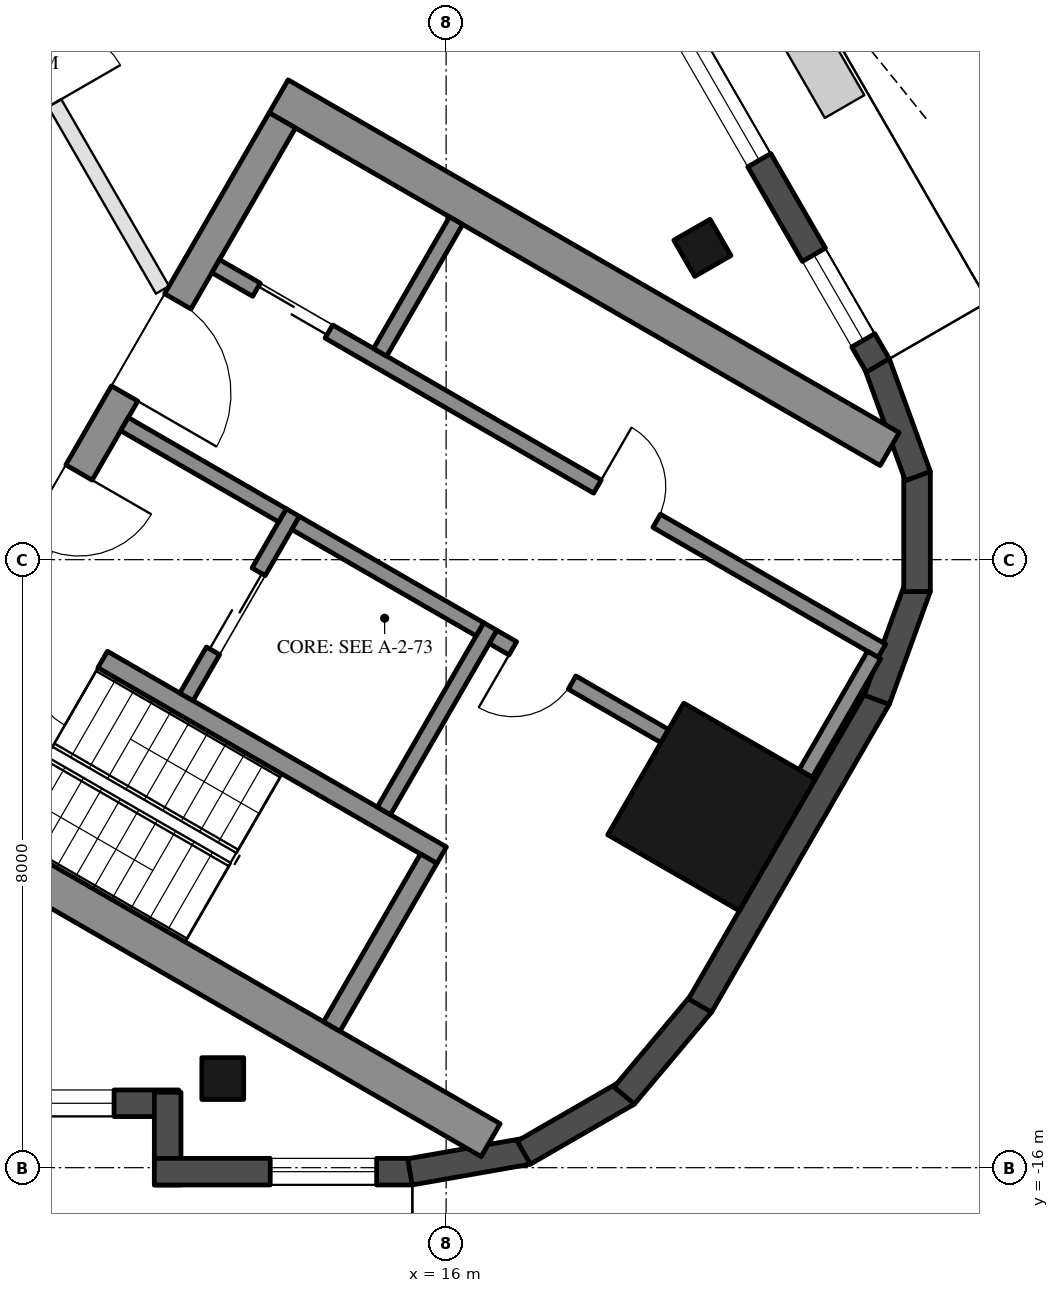
"""IFC4 building model, lengths in metres.
Left out: names, types, materials, properties, quantities, classifications, styles, units other than length and angle.
Written with IfcOpenShell. Run it as: python <this file> out.ifc"""

import sys

from ifc_helpers import new_model, si_unit, direction, frame, frame_2d, origin, origin_2d, place, context, subcontext, project, spatial, rectangle, hollow_rectangle, extrude, boolean, halfspace, element, fill, save


model = new_model("IFC4")
c1 = context("Model", 3, precision=1e-05, world=origin(), true_north=direction((0.0, 1.0)))
c2 = subcontext(c1, "Body", "Model", "MODEL_VIEW")
j1 = project(units=[si_unit("LENGTHUNIT", "METRE"), si_unit("PLANEANGLEUNIT", "RADIAN")], contexts=[c1])
p1 = place(None, origin())
s1 = spatial("IfcSite", under=j1, at=p1, CompositionType="ELEMENT")
p2 = place(p1, origin())
s2 = spatial("IfcBuilding", under=s1, at=p2, CompositionType="ELEMENT")
p3 = place(p2, frame((0.0, 0.0, 313.3)))
s3 = spatial("IfcBuildingStorey", under=s2, at=p3, CompositionType="ELEMENT", Elevation=313.3)
for number, where, z_axis, x_axis in (
    (1, (13.061, -14.827, 0.0), (0.0, 0.0, 1.0), (-1.0, 0.0, 0.0)),
    (2, (19.372, -3.898, 0.0), (0.0, 0.0, 1.0), (-0.5, 0.866, 0.0)),
):
    element("IfcColumn", number, at=place(p3, frame(where, z_axis=z_axis, x_axis=x_axis)), inside=s3, PredefinedType="COLUMN", context=c2, shape_type="SweptSolid", body=[
        boolean("DIFFERENCE", extrude(hollow_rectangle(XDim=0.55, YDim=0.55, WallThickness=0.025, at=origin_2d()), origin(), (0.0, 0.0, 1.0), 3.7), halfspace(frame((0.0, 0.0, 0.04), z_axis=(0.0, 0.0, 1.0), x_axis=(1.0, 0.0, 0.0)), True)),
    ])
p4 = place(p3, frame((19.492, -11.254, 0.0), z_axis=(0.0, 0.0, 1.0), x_axis=(0.5, 0.866025403784, 0.0)))
e3 = element("IfcColumn", 3, at=p4, inside=s3, PredefinedType="COLUMN", context=c2, shape_type="SweptSolid", body=[
    boolean("DIFFERENCE", extrude(hollow_rectangle(XDim=2.0, YDim=2.0, WallThickness=0.05, at=origin_2d()), origin(), (0.0, 0.0, 1.0), 3.7), halfspace(frame((0.0, 0.0, 0.113), z_axis=(0.0, 0.0, 1.0), x_axis=(1.0, 0.0, 0.0)), True)),
])
p5 = place(p3, frame((7.111, -15.153, 0.0), z_axis=(0.0, 0.0, 1.0), x_axis=(1.0, 0.0, 0.0)))
e4 = element("IfcWall", 4, at=p5, inside=s3, PredefinedType="SOLIDWALL", context=c2, shape_type="SweptSolid", body=[
    extrude(rectangle(XDim=5.371, YDim=0.35, at=frame_2d((2.686, 0.0))), origin(), (0.0, 0.0, 1.0), 3.55),
])
p6 = place(p5, frame((0.32, 0.0, 0.0)))
e5 = element("IfcOpeningElement", 5, at=p6, cuts=e4, PredefinedType="OPENING", context=c2, shape_type="SweptSolid", body=[
    extrude(rectangle(XDim=2.4, YDim=2.4, at=frame_2d((1.2, 1.2))), frame((0.0, 0.185, 0.0), z_axis=(0.0, -1.0, 0.0), x_axis=(1.0, 0.0, 0.0)), (0.0, 0.0, 1.0), 0.37),
])
p7 = place(p5, frame((3.021, 0.0, 0.3)))
e6 = element("IfcOpeningElement", 6, at=p7, cuts=e4, PredefinedType="OPENING", context=c2, shape_type="SweptSolid", body=[
    extrude(rectangle(XDim=1.5, YDim=2.65, at=frame_2d((0.75, 1.325))), frame((0.0, 0.185, 0.0), z_axis=(0.0, -1.0, 0.0), x_axis=(1.0, 0.0, 0.0)), (0.0, 0.0, 1.0), 0.37),
])
p8 = place(p3, frame((12.336, -15.008, 0.0), z_axis=(0.0, 0.0, 1.0), x_axis=(0.0, -1.0, 0.0)))
e7 = element("IfcWall", 7, at=p8, inside=s3, PredefinedType="SOLIDWALL", context=c2, shape_type="SweptSolid", body=[
    extrude(rectangle(XDim=1.22, YDim=0.35, at=frame_2d((0.61, 0.0))), origin(), (0.0, 0.0, 1.0), 3.55),
])
p9 = place(p3, frame((12.161, -16.052, 0.0), z_axis=(0.0, 0.0, 1.0), x_axis=(1.0, 0.0, 0.0)))
e8 = element("IfcWall", 8, at=p9, inside=s3, PredefinedType="SOLIDWALL", context=c2, shape_type="SweptSolid", body=[
    extrude(rectangle(XDim=3.393, YDim=0.35, at=frame_2d((1.697, 0.0))), origin(), (0.0, 0.0, 1.0), 3.55),
])
p10 = place(p9, frame((1.524, 0.0, 0.3)))
e9 = element("IfcOpeningElement", 9, at=p10, cuts=e8, PredefinedType="OPENING", context=c2, shape_type="SweptSolid", body=[
    extrude(rectangle(XDim=1.4, YDim=2.65, at=frame_2d((0.7, 1.325))), frame((0.0, 0.185, 0.0), z_axis=(0.0, -1.0, 0.0), x_axis=(1.0, 0.0, 0.0)), (0.0, 0.0, 1.0), 0.37),
])
for number, where, z_axis, x_axis in (
    (10, (15.524, -16.055, 0.0), (0.0, 0.0, 1.0), (0.985, 0.174, 0.0)),
    (11, (17.022, -15.802, 0.0), (0.0, 0.0, 1.0), (0.866, 0.5, 0.0)),
    (12, (18.343, -15.051, 0.0), (0.0, 0.0, 1.0), (0.643, 0.766, 0.0)),
):
    element("IfcWall", number, at=place(p3, frame(where, z_axis=z_axis, x_axis=x_axis)), inside=s3, PredefinedType="SOLIDWALL", context=c2, shape_type="SweptSolid", body=[
        extrude(rectangle(XDim=1.579, YDim=0.35, at=frame_2d((0.79, 0.0))), origin(), (0.0, 0.0, 1.0), 3.55),
    ])
p11 = place(p3, frame((19.34, -13.867, 0.0), z_axis=(0.0, 0.0, 1.0), x_axis=(0.500023656998, 0.86601174498, 0.0)))
e13 = element("IfcWall", 13, at=p11, inside=s3, PredefinedType="SOLIDWALL", context=c2, shape_type="SweptSolid", body=[
    extrude(rectangle(XDim=4.677, YDim=0.35, at=frame_2d((2.339, 0.0))), origin(), (0.0, 0.0, 1.0), 3.55),
])
for number, where, z_axis, x_axis in (
    (14, (21.666, -9.844, 0.0), (0.0, 0.0, 1.0), (0.342, 0.94, 0.0)),
    (15, (22.196, -8.42, 0.0), (0.0, 0.0, 1.0), (0.0, 1.0, 0.0)),
    (16, (22.206, -6.9, 0.0), (0.0, 0.0, 1.0), (-0.342, 0.94, 0.0)),
):
    element("IfcWall", number, at=place(p3, frame(where, z_axis=z_axis, x_axis=x_axis)), inside=s3, PredefinedType="SOLIDWALL", context=c2, shape_type="SweptSolid", body=[
        extrude(rectangle(XDim=1.579, YDim=0.35, at=frame_2d((0.79, 0.0))), origin(), (0.0, 0.0, 1.0), 3.55),
    ])
p12 = place(p3, frame((21.679, -5.444, 0.0), z_axis=(0.0, 0.0, 1.0), x_axis=(-0.500020587865, 0.866013517049, 0.0)))
e17 = element("IfcWall", 17, at=p12, inside=s3, PredefinedType="SOLIDWALL", context=c2, shape_type="SweptSolid", body=[
    extrude(rectangle(XDim=9.924, YDim=0.35, at=frame_2d((4.962, 0.0))), origin(), (0.0, 0.0, 1.0), 3.55),
])
p13 = place(p12, frame((0.381, 0.0, 0.3)))
e18 = element("IfcOpeningElement", 18, at=p13, cuts=e17, PredefinedType="OPENING", context=c2, shape_type="SweptSolid", body=[
    extrude(rectangle(XDim=1.3, YDim=2.65, at=frame_2d((0.65, 1.325))), frame((0.0, 0.185, 0.0), z_axis=(0.0, -1.0, 0.0), x_axis=(1.0, 0.0, 0.0)), (0.0, 0.0, 1.0), 0.37),
])
p14 = place(p12, frame((5.999, 0.0, 0.0)))
e19 = element("IfcOpeningElement", 19, at=p14, cuts=e17, PredefinedType="OPENING", context=c2, shape_type="SweptSolid", body=[
    extrude(rectangle(XDim=2.4, YDim=2.4, at=frame_2d((1.2, 1.2))), frame((0.0, 0.185, 0.0), z_axis=(0.0, -1.0, 0.0), x_axis=(1.0, 0.0, 0.0)), (0.0, 0.0, 1.0), 0.37),
])
p15 = place(p12, frame((3.118, 0.0, 0.3)))
e20 = element("IfcOpeningElement", 20, at=p15, cuts=e17, PredefinedType="OPENING", context=c2, shape_type="SweptSolid", body=[
    extrude(rectangle(XDim=2.5, YDim=2.65, at=frame_2d((1.25, 1.325))), frame((0.0, 0.185, 0.0), z_axis=(0.0, -1.0, 0.0), x_axis=(1.0, 0.0, 0.0)), (0.0, 0.0, 1.0), 0.37),
])
for number, where, z_axis, x_axis in (
    (21, (8.547, -10.997, 0.0), (0.0, 0.0, 1.0), (0.866, -0.5, 0.0)),
    (22, (13.797, -1.903, 0.0), (0.0, 0.0, 1.0), (0.866, -0.5, 0.0)),
):
    element("IfcWall", number, at=place(p3, frame(where, z_axis=z_axis, x_axis=x_axis)), inside=s3, PredefinedType="SHEAR", context=c2, shape_type="SweptSolid", body=[
        extrude(rectangle(XDim=9.283, YDim=0.5, at=frame_2d((4.641, 0.0))), origin(), (0.0, 0.0, 1.0), 3.5),
    ])
p16 = place(p3, frame((8.845, -10.88, 0.0), z_axis=(0.0, 0.0, 1.0), x_axis=(0.500004234368, 0.866022959057, 0.0)))
e23 = element("IfcWall", 23, at=p16, inside=s3, PredefinedType="SHEAR", context=c2, shape_type="SweptSolid", body=[
    extrude(rectangle(XDim=10.0, YDim=0.4, at=frame_2d((5.0, 0.0))), origin(), (0.0, 0.0, 1.0), 3.5),
])
p17 = place(p16, frame((3.55, 0.0, 0.0)))
e24 = element("IfcOpeningElement", 24, at=p17, cuts=e23, PredefinedType="OPENING", context=c2, shape_type="SweptSolid", body=[
    extrude(rectangle(XDim=1.1, YDim=2.1, at=frame_2d((0.55, 1.05))), frame((0.0, 0.21, 0.0), z_axis=(0.0, -1.0, 0.0), x_axis=(1.0, 0.0, 0.0)), (0.0, 0.0, 1.0), 0.42),
])
p18 = place(p16, frame((5.85, 0.0, 0.0)))
e25 = element("IfcOpeningElement", 25, at=p18, cuts=e23, PredefinedType="OPENING", context=c2, shape_type="SweptSolid", body=[
    extrude(rectangle(XDim=1.4, YDim=2.1, at=frame_2d((0.7, 1.05))), frame((0.0, 0.21, 0.0), z_axis=(0.0, -1.0, 0.0), x_axis=(1.0, 0.0, 0.0)), (0.0, 0.0, 1.0), 0.42),
])
p19 = place(p3, frame((10.356, -8.664, 0.0), z_axis=(0.0, 0.0, 1.0), x_axis=(0.866028629588, -0.499994412703, 0.0)))
e26 = element("IfcWall", 26, at=p19, inside=s3, PredefinedType="SHEAR", context=c2, shape_type="SweptSolid", body=[
    extrude(rectangle(XDim=6.45, YDim=0.25, at=frame_2d((3.225, 0.0))), origin(), (0.0, 0.0, 1.0), 3.5),
])
p20 = place(p19, frame((0.3, 0.0, 0.0)))
e27 = element("IfcOpeningElement", 27, at=p20, cuts=e26, PredefinedType="OPENING", context=c2, shape_type="SweptSolid", body=[
    extrude(rectangle(XDim=1.0, YDim=2.1, at=frame_2d((0.5, 1.05))), frame((0.0, 0.135, 0.0), z_axis=(0.0, -1.0, 0.0), x_axis=(1.0, 0.0, 0.0)), (0.0, 0.0, 1.0), 0.27),
])
p21 = place(p3, frame((14.496, -14.143, 0.0), z_axis=(0.0, 0.0, 1.0), x_axis=(0.500062241894, 0.865989465428, 0.0)))
e28 = element("IfcWall", 28, at=p21, inside=s3, PredefinedType="SHEAR", context=c2, shape_type="SweptSolid", body=[
    extrude(rectangle(XDim=2.55, YDim=0.25, at=frame_2d((1.275, 0.0))), origin(), (0.0, 0.0, 1.0), 3.5),
])
p22 = place(p3, frame((15.181, -11.305, 0.0), z_axis=(0.0, 0.0, 1.0), x_axis=(0.49994636267, 0.866056369097, 0.0)))
e29 = element("IfcWall", 29, at=p22, inside=s3, PredefinedType="SHEAR", context=c2, shape_type="SweptSolid", body=[
    extrude(rectangle(XDim=2.8, YDim=0.2, at=frame_2d((1.4, 0.0))), origin(), (0.0, 0.0, 1.0), 3.5),
])
p23 = place(p3, frame((12.583, -9.805, 0.0), z_axis=(0.0, 0.0, 1.0), x_axis=(0.49994636267, 0.866056369097, 0.0)))
e30 = element("IfcWall", 30, at=p23, inside=s3, PredefinedType="SHEAR", context=c2, shape_type="SweptSolid", body=[
    extrude(rectangle(XDim=2.8, YDim=0.2, at=frame_2d((1.4, 0.0))), origin(), (0.0, 0.0, 1.0), 3.5),
])
p24 = place(p23, frame((0.7, 0.0, 0.0)))
e31 = element("IfcOpeningElement", 31, at=p24, cuts=e30, PredefinedType="OPENING", context=c2, shape_type="SweptSolid", body=[
    extrude(rectangle(XDim=1.2, YDim=2.1, at=frame_2d((0.6, 1.05))), frame((0.0, 0.11, 0.0), z_axis=(0.0, -1.0, 0.0), x_axis=(1.0, 0.0, 0.0)), (0.0, 0.0, 1.0), 0.22),
])
p25 = place(p3, frame((11.768, -6.217, 0.0), z_axis=(0.0, 0.0, 1.0), x_axis=(0.866050077142, -0.499957262057, 0.0)))
e32 = element("IfcWall", 32, at=p25, inside=s3, PredefinedType="SHEAR", context=c2, shape_type="SweptSolid", body=[
    extrude(rectangle(XDim=2.4, YDim=0.2, at=frame_2d((1.2, 0.0))), origin(), (0.0, 0.0, 1.0), 3.5),
])
p26 = place(p3, frame((14.02, -7.517, 0.0), z_axis=(0.0, 0.0, 1.0), x_axis=(0.866034573852, -0.49998411664, 0.0)))
e33 = element("IfcWall", 33, at=p26, inside=s3, PredefinedType="SHEAR", context=c2, shape_type="SweptSolid", body=[
    extrude(rectangle(XDim=2.8, YDim=0.2, at=frame_2d((1.4, 0.0))), origin(), (0.0, 0.0, 1.0), 3.5),
])
p27 = place(p3, frame((12.968, -4.138, 0.0), z_axis=(0.0, 0.0, 1.0), x_axis=(0.866025710499, -0.499999468754, 0.0)))
e34 = element("IfcWall", 34, at=p27, inside=s3, PredefinedType="SHEAR", context=c2, shape_type="SweptSolid", body=[
    extrude(rectangle(XDim=10.121, YDim=0.2, at=frame_2d((5.061, 0.0))), origin(), (0.0, 0.0, 1.0), 3.5),
])
p28 = place(p27, frame((0.62, 0.0, 0.0)))
e35 = element("IfcOpeningElement", 35, at=p28, cuts=e34, PredefinedType="OPENING", context=c2, shape_type="SweptSolid", body=[
    extrude(rectangle(XDim=1.1, YDim=2.1, at=frame_2d((0.55, 1.05))), frame((0.0, 0.11, 0.0), z_axis=(0.0, -1.0, 0.0), x_axis=(1.0, 0.0, 0.0)), (0.0, 0.0, 1.0), 0.22),
])
p29 = place(p27, frame((5.8, 0.0, 0.0)))
e36 = element("IfcOpeningElement", 36, at=p29, cuts=e34, PredefinedType="OPENING", context=c2, shape_type="SweptSolid", body=[
    extrude(rectangle(XDim=0.9, YDim=2.1, at=frame_2d((0.45, 1.05))), frame((0.0, 0.11, 0.0), z_axis=(0.0, -1.0, 0.0), x_axis=(1.0, 0.0, 0.0)), (0.0, 0.0, 1.0), 0.22),
])
p30 = place(p3, frame((20.73, -10.814, 0.0), z_axis=(0.0, 0.0, 1.0), x_axis=(0.499961193289, 0.866047807691, 0.0)))
e37 = element("IfcWall", 37, at=p30, inside=s3, PredefinedType="SHEAR", context=c2, shape_type="SweptSolid", body=[
    extrude(rectangle(XDim=1.8, YDim=0.2, at=frame_2d((0.9, 0.0))), origin(), (0.0, 0.0, 1.0), 3.5),
])
p31 = place(p3, frame((16.618, -9.017, 0.0), z_axis=(0.0, 0.0, 1.0), x_axis=(0.866045268016, -0.499965592563, 0.0)))
e38 = element("IfcWall", 38, at=p31, inside=s3, PredefinedType="SHEAR", context=c2, shape_type="SweptSolid", body=[
    extrude(rectangle(XDim=2.608, YDim=0.2, at=frame_2d((1.304, 0.0))), origin(), (0.0, 0.0, 1.0), 3.5),
])
p32 = place(p31, frame((0.3, 0.0, 0.0)))
e39 = element("IfcOpeningElement", 39, at=p32, cuts=e38, PredefinedType="OPENING", context=c2, shape_type="SweptSolid", body=[
    extrude(rectangle(XDim=0.9, YDim=2.1, at=frame_2d((0.45, 1.05))), frame((0.0, 0.11, 0.0), z_axis=(0.0, -1.0, 0.0), x_axis=(1.0, 0.0, 0.0)), (0.0, 0.0, 1.0), 0.22),
])
p33 = place(p3, frame((15.131, -5.272, 0.0), z_axis=(0.0, 0.0, 1.0), x_axis=(0.499972520799, 0.866041268327, 0.0)))
e40 = element("IfcWall", 40, at=p33, inside=s3, PredefinedType="SHEAR", context=c2, shape_type="SweptSolid", body=[
    extrude(rectangle(XDim=2.0, YDim=0.2, at=frame_2d((1.0, 0.0))), origin(), (0.0, 0.0, 1.0), 3.5),
])
p34 = place(p3, frame((9.127, 0.992, 0.0), z_axis=(0.0, 0.0, 1.0), x_axis=(0.500012817413, -0.866018003521, 0.0)))
e41 = element("IfcWall", 41, at=p34, inside=s3, PredefinedType="PARTITIONING", context=c2, shape_type="SweptSolid", body=[
    extrude(rectangle(XDim=6.283, YDim=0.2, at=frame_2d((3.142, 0.0))), origin(), (0.0, 0.0, 1.0), 3.1),
])
p35 = place(p34, frame((2.446, 0.0, 0.0)))
e42 = element("IfcOpeningElement", 42, at=p35, cuts=e41, PredefinedType="OPENING", context=c2, shape_type="SweptSolid", body=[
    extrude(rectangle(XDim=1.0, YDim=2.1, at=frame_2d((0.5, 1.05))), frame((0.0, 0.11, 0.0), z_axis=(0.0, -1.0, 0.0), x_axis=(1.0, 0.0, 0.0)), (0.0, 0.0, 1.0), 0.22),
])
p36 = place(p7, origin())
e43 = element("IfcWindow", 43, at=p36, inside=s3, PartitioningType="SINGLE_PANEL", PredefinedType="WINDOW", context=c2, shape_type="SweptSolid", body=[
    extrude(rectangle(XDim=1.5, YDim=2.65, at=frame_2d((0.75, 1.325))), frame((0.0, 0.03, 0.0), z_axis=(0.0, -1.0, 0.0), x_axis=(1.0, 0.0, 0.0)), (0.0, 0.0, 1.0), 0.06),
])
fill(e6, e43)
p37 = place(p10, origin())
e44 = element("IfcWindow", 44, at=p37, inside=s3, PartitioningType="SINGLE_PANEL", PredefinedType="WINDOW", context=c2, shape_type="SweptSolid", body=[
    extrude(rectangle(XDim=1.4, YDim=2.65, at=frame_2d((0.7, 1.325))), frame((0.0, 0.03, 0.0), z_axis=(0.0, -1.0, 0.0), x_axis=(1.0, 0.0, 0.0)), (0.0, 0.0, 1.0), 0.06),
])
fill(e9, e44)
p38 = place(p13, origin())
e45 = element("IfcWindow", 45, at=p38, inside=s3, PartitioningType="SINGLE_PANEL", PredefinedType="WINDOW", context=c2, shape_type="SweptSolid", body=[
    extrude(rectangle(XDim=1.3, YDim=2.65, at=frame_2d((0.65, 1.325))), frame((0.0, 0.03, 0.0), z_axis=(0.0, -1.0, 0.0), x_axis=(1.0, 0.0, 0.0)), (0.0, 0.0, 1.0), 0.06),
])
fill(e18, e45)
p39 = place(p15, origin())
e46 = element("IfcWindow", 46, at=p39, inside=s3, PartitioningType="SINGLE_PANEL", PredefinedType="WINDOW", context=c2, shape_type="SweptSolid", body=[
    extrude(rectangle(XDim=2.5, YDim=2.65, at=frame_2d((1.25, 1.325))), frame((0.0, 0.03, 0.0), z_axis=(0.0, -1.0, 0.0), x_axis=(1.0, 0.0, 0.0)), (0.0, 0.0, 1.0), 0.06),
])
fill(e20, e46)
p40 = place(p24, origin())
e47 = element("IfcDoor", 47, at=p40, inside=s3, OperationType="DOUBLE_DOOR_SLIDING", PredefinedType="DOOR", context=c2, shape_type="SweptSolid", body=[
    extrude(rectangle(XDim=1.2, YDim=2.1, at=frame_2d((0.6, 1.05))), frame((0.0, 0.025, 0.0), z_axis=(0.0, -1.0, 0.0), x_axis=(1.0, 0.0, 0.0)), (0.0, 0.0, 1.0), 0.05),
])
fill(e31, e47)
p41 = place(p28, origin())
e48 = element("IfcDoor", 48, at=p41, inside=s3, OperationType="DOUBLE_DOOR_SLIDING", PredefinedType="DOOR", context=c2, shape_type="SweptSolid", body=[
    extrude(rectangle(XDim=1.1, YDim=2.1, at=frame_2d((0.55, 1.05))), frame((0.0, 0.025, 0.0), z_axis=(0.0, -1.0, 0.0), x_axis=(1.0, 0.0, 0.0)), (0.0, 0.0, 1.0), 0.05),
])
fill(e35, e48)
p42 = place(p29, origin())
e49 = element("IfcDoor", 49, at=p42, inside=s3, OperationType="SINGLE_SWING_LEFT", PredefinedType="DOOR", context=c2, shape_type="SweptSolid", body=[
    extrude(rectangle(XDim=0.9, YDim=2.1, at=frame_2d((0.45, 1.05))), frame((0.0, 0.025, 0.0), z_axis=(0.0, -1.0, 0.0), x_axis=(1.0, 0.0, 0.0)), (0.0, 0.0, 1.0), 0.05),
])
fill(e36, e49)
p43 = place(p32, frame((0.9, 0.0, 0.0), z_axis=(0.0, 0.0, 1.0), x_axis=(-1.0, 0.0, 0.0)))
e50 = element("IfcDoor", 50, at=p43, inside=s3, OperationType="SINGLE_SWING_RIGHT", PredefinedType="DOOR", context=c2, shape_type="SweptSolid", body=[
    extrude(rectangle(XDim=0.9, YDim=2.1, at=frame_2d((0.45, 1.05))), frame((0.0, 0.025, 0.0), z_axis=(0.0, -1.0, 0.0), x_axis=(1.0, 0.0, 0.0)), (0.0, 0.0, 1.0), 0.05),
])
fill(e39, e50)
p44 = place(p17, frame((1.1, 0.0, 0.0), z_axis=(0.0, 0.0, 1.0), x_axis=(-1.0, 0.0, 0.0)))
e51 = element("IfcDoor", 51, at=p44, inside=s3, OperationType="SINGLE_SWING_LEFT", PredefinedType="DOOR", context=c2, shape_type="SweptSolid", body=[
    extrude(rectangle(XDim=1.1, YDim=2.1, at=frame_2d((0.55, 1.05))), frame((0.0, 0.025, 0.0), z_axis=(0.0, -1.0, 0.0), x_axis=(1.0, 0.0, 0.0)), (0.0, 0.0, 1.0), 0.05),
])
fill(e24, e51)
p45 = place(p18, frame((1.4, 0.0, 0.0), z_axis=(0.0, 0.0, 1.0), x_axis=(-1.0, 0.0, 0.0)))
e52 = element("IfcDoor", 52, at=p45, inside=s3, OperationType="DOUBLE_DOOR_SINGLE_SWING", PredefinedType="DOOR", context=c2, shape_type="SweptSolid", body=[
    extrude(rectangle(XDim=1.4, YDim=2.1, at=frame_2d((0.7, 1.05))), frame((0.0, 0.025, 0.0), z_axis=(0.0, -1.0, 0.0), x_axis=(1.0, 0.0, 0.0)), (0.0, 0.0, 1.0), 0.05),
])
fill(e25, e52)
p46 = place(p20, frame((1.0, 0.0, 0.0), z_axis=(0.0, 0.0, 1.0), x_axis=(-1.0, 0.0, 0.0)))
e53 = element("IfcDoor", 53, at=p46, inside=s3, OperationType="SINGLE_SWING_LEFT", PredefinedType="DOOR", context=c2, shape_type="SweptSolid", body=[
    extrude(rectangle(XDim=1.0, YDim=2.1, at=frame_2d((0.5, 1.05))), frame((0.0, 0.025, 0.0), z_axis=(0.0, -1.0, 0.0), x_axis=(1.0, 0.0, 0.0)), (0.0, 0.0, 1.0), 0.05),
])
fill(e27, e53)
p47 = place(p35, origin())
e54 = element("IfcDoor", 54, at=p47, inside=s3, OperationType="SINGLE_SWING_RIGHT", PredefinedType="DOOR", context=c2, shape_type="SweptSolid", body=[
    extrude(rectangle(XDim=1.0, YDim=2.1, at=frame_2d((0.5, 1.05))), frame((0.0, 0.025, 0.0), z_axis=(0.0, -1.0, 0.0), x_axis=(1.0, 0.0, 0.0)), (0.0, 0.0, 1.0), 0.05),
])
fill(e42, e54)
save(model, sys.argv[1])
